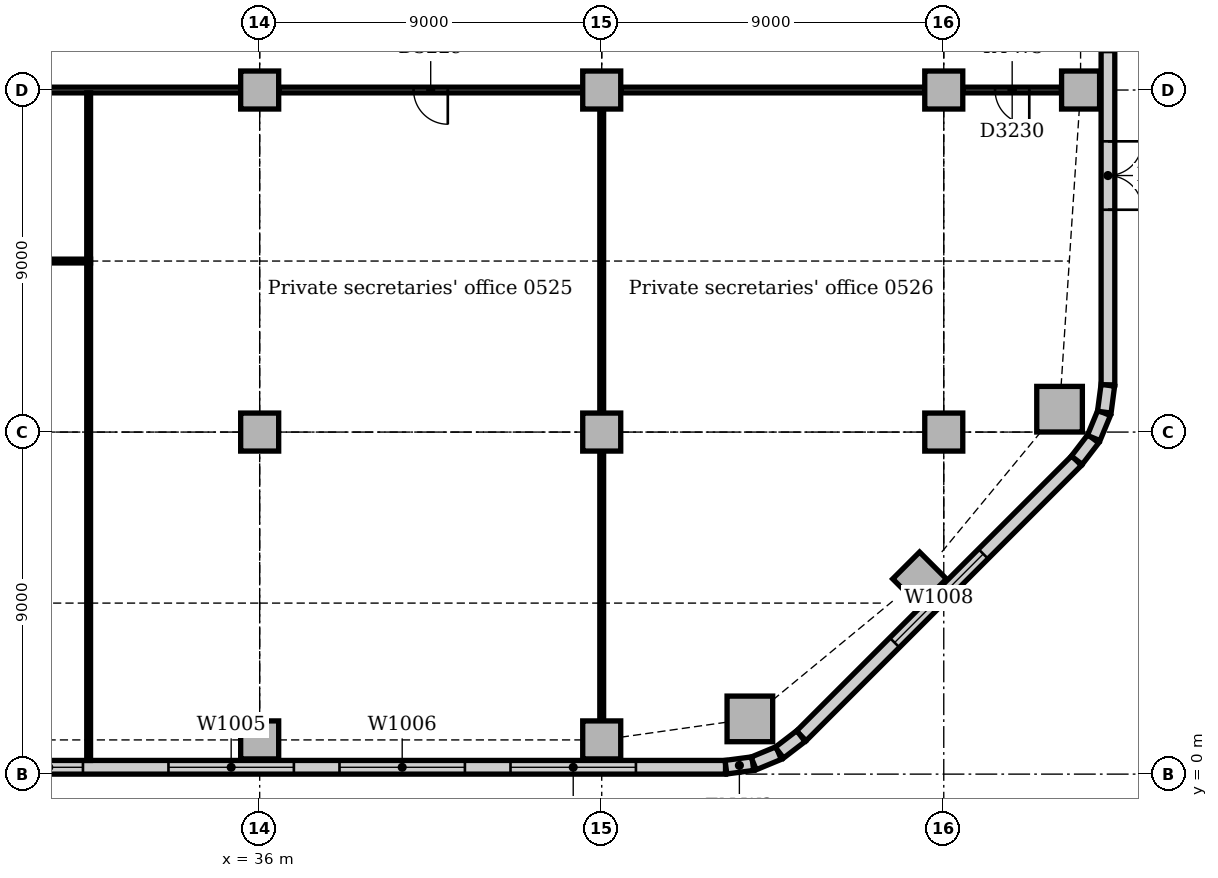
"""IFC4 building model, lengths in metres.
Left out: names, types, materials, properties, quantities, classifications, styles, units other than length and angle.
Written with IfcOpenShell. Run it as: python <this file> out.ifc"""

import sys

from ifc_helpers import new_model, si_unit, direction, frame, frame_2d, origin, origin_2d, place, context, subcontext, project, spatial, rectangle, extrude, element, fill, save


model = new_model("IFC4")
c1 = context("Model", 3, precision=1e-05, world=origin(), true_north=direction((0.0, 1.0)))
c2 = subcontext(c1, "Body", "Model", "MODEL_VIEW")
j1 = project(units=[si_unit("LENGTHUNIT", "METRE"), si_unit("PLANEANGLEUNIT", "RADIAN")], contexts=[c1])
p1 = place(None, origin())
s1 = spatial("IfcSite", under=j1, at=p1, CompositionType="ELEMENT")
p2 = place(p1, origin())
s2 = spatial("IfcBuilding", under=s1, at=p2, CompositionType="ELEMENT")
p3 = place(p2, frame((0.0, 0.0, 26.0)))
s3 = spatial("IfcBuildingStorey", under=s2, at=p3, CompositionType="ELEMENT", Elevation=26.0)
for number, where, z_axis, x_axis in (
    (1, (48.898, 1.453, 0.0), (0.0, 0.0, 1.0), (1.0, 0.0, 0.0)),
    (2, (57.047, 9.602, 0.0), (0.0, 0.0, 1.0), (1.0, 0.0, 0.0)),
):
    element("IfcColumn", number, at=place(p3, frame(where, z_axis=z_axis, x_axis=x_axis)), inside=s3, PredefinedType="COLUMN", context=c2, shape_type="SweptSolid", body=[
        extrude(rectangle(XDim=1.2, YDim=1.2, at=origin_2d()), origin(), (0.0, 0.0, 1.0), 3.85),
    ])
for number, where, z_axis, x_axis in (
    (3, (36.0, 0.9, 0.0), (0.0, 0.0, 1.0), (1.0, 0.0, 0.0)),
    (4, (45.0, 0.9, 0.0), (0.0, 0.0, 1.0), (1.0, 0.0, 0.0)),
    (5, (53.364, 5.136, 0.0), (0.0, 0.0, 1.0), (0.707, 0.707, 0.0)),
    (6, (57.6, 18.0, 0.0), (0.0, 0.0, 1.0), (1.0, 0.0, 0.0)),
    (7, (36.0, 9.0, 0.0), (0.0, 0.0, 1.0), (1.0, 0.0, 0.0)),
    (8, (36.0, 18.0, 0.0), (0.0, 0.0, 1.0), (1.0, 0.0, 0.0)),
    (9, (45.0, 9.0, 0.0), (0.0, 0.0, 1.0), (1.0, 0.0, 0.0)),
    (10, (45.0, 18.0, 0.0), (0.0, 0.0, 1.0), (1.0, 0.0, 0.0)),
    (11, (54.0, 9.0, 0.0), (0.0, 0.0, 1.0), (1.0, 0.0, 0.0)),
    (12, (54.0, 18.0, 0.0), (0.0, 0.0, 1.0), (1.0, 0.0, 0.0)),
):
    element("IfcColumn", number, at=place(p3, frame(where, z_axis=z_axis, x_axis=x_axis)), inside=s3, PredefinedType="COLUMN", context=c2, shape_type="SweptSolid", body=[
        extrude(rectangle(XDim=1.0, YDim=1.0, at=origin_2d()), origin(), (0.0, 0.0, 1.0), 3.85),
    ])
p4 = place(p3, frame((4.243, 0.18, 0.0), z_axis=(0.0, 0.0, 1.0), x_axis=(1.0, 0.0, 0.0)))
e13 = element("IfcWall", 13, at=p4, inside=s3, PredefinedType="STANDARD", context=c2, shape_type="SweptSolid", body=[
    extrude(rectangle(XDim=44.015, YDim=0.36, at=frame_2d((22.007, 0.0))), origin(), (0.0, 0.0, 1.0), 3.85),
])
p5 = place(p4, frame((2.707, 0.0, 0.9)))
e14 = element("IfcOpeningElement", 14, at=p5, cuts=e13, PredefinedType="OPENING", context=c2, shape_type="SweptSolid", body=[
    extrude(rectangle(XDim=3.3, YDim=1.6, at=frame_2d((1.65, 0.8))), frame((0.0, 0.19, 0.0), z_axis=(0.0, -1.0, 0.0), x_axis=(1.0, 0.0, 0.0)), (0.0, 0.0, 1.0), 0.38),
])
p6 = place(p4, frame((7.157, 0.0, 0.0)))
e15 = element("IfcOpeningElement", 15, at=p6, cuts=e13, PredefinedType="OPENING", context=c2, shape_type="SweptSolid", body=[
    extrude(rectangle(XDim=1.8, YDim=2.4, at=frame_2d((0.9, 1.2))), frame((0.0, 0.19, 0.0), z_axis=(0.0, -1.0, 0.0), x_axis=(1.0, 0.0, 0.0)), (0.0, 0.0, 1.0), 0.38),
])
p7 = place(p4, frame((11.357, 0.0, 0.9)))
e16 = element("IfcOpeningElement", 16, at=p7, cuts=e13, PredefinedType="OPENING", context=c2, shape_type="SweptSolid", body=[
    extrude(rectangle(XDim=3.3, YDim=1.6, at=frame_2d((1.65, 0.8))), frame((0.0, 0.19, 0.0), z_axis=(0.0, -1.0, 0.0), x_axis=(1.0, 0.0, 0.0)), (0.0, 0.0, 1.0), 0.38),
])
p8 = place(p4, frame((16.307, 0.0, 0.9)))
e17 = element("IfcOpeningElement", 17, at=p8, cuts=e13, PredefinedType="OPENING", context=c2, shape_type="SweptSolid", body=[
    extrude(rectangle(XDim=1.8, YDim=1.6, at=frame_2d((0.9, 0.8))), frame((0.0, 0.19, 0.0), z_axis=(0.0, -1.0, 0.0), x_axis=(1.0, 0.0, 0.0)), (0.0, 0.0, 1.0), 0.38),
])
p9 = place(p4, frame((20.357, 0.0, 0.9)))
e18 = element("IfcOpeningElement", 18, at=p9, cuts=e13, PredefinedType="OPENING", context=c2, shape_type="SweptSolid", body=[
    extrude(rectangle(XDim=3.3, YDim=1.6, at=frame_2d((1.65, 0.8))), frame((0.0, 0.19, 0.0), z_axis=(0.0, -1.0, 0.0), x_axis=(1.0, 0.0, 0.0)), (0.0, 0.0, 1.0), 0.38),
])
p10 = place(p4, frame((25.307, 0.0, 0.9)))
e19 = element("IfcOpeningElement", 19, at=p10, cuts=e13, PredefinedType="OPENING", context=c2, shape_type="SweptSolid", body=[
    extrude(rectangle(XDim=1.8, YDim=1.6, at=frame_2d((0.9, 0.8))), frame((0.0, 0.19, 0.0), z_axis=(0.0, -1.0, 0.0), x_axis=(1.0, 0.0, 0.0)), (0.0, 0.0, 1.0), 0.38),
])
p11 = place(p4, frame((29.357, 0.0, 0.9)))
e20 = element("IfcOpeningElement", 20, at=p11, cuts=e13, PredefinedType="OPENING", context=c2, shape_type="SweptSolid", body=[
    extrude(rectangle(XDim=3.3, YDim=1.6, at=frame_2d((1.65, 0.8))), frame((0.0, 0.19, 0.0), z_axis=(0.0, -1.0, 0.0), x_axis=(1.0, 0.0, 0.0)), (0.0, 0.0, 1.0), 0.38),
])
p12 = place(p4, frame((33.857, 0.0, 0.9)))
e21 = element("IfcOpeningElement", 21, at=p12, cuts=e13, PredefinedType="OPENING", context=c2, shape_type="SweptSolid", body=[
    extrude(rectangle(XDim=3.3, YDim=1.6, at=frame_2d((1.65, 0.8))), frame((0.0, 0.19, 0.0), z_axis=(0.0, -1.0, 0.0), x_axis=(1.0, 0.0, 0.0)), (0.0, 0.0, 1.0), 0.38),
])
p13 = place(p4, frame((38.357, 0.0, 0.9)))
e22 = element("IfcOpeningElement", 22, at=p13, cuts=e13, PredefinedType="OPENING", context=c2, shape_type="SweptSolid", body=[
    extrude(rectangle(XDim=3.3, YDim=1.6, at=frame_2d((1.65, 0.8))), frame((0.0, 0.19, 0.0), z_axis=(0.0, -1.0, 0.0), x_axis=(1.0, 0.0, 0.0)), (0.0, 0.0, 1.0), 0.38),
])
p14 = place(p3, frame((50.251, 1.006, 0.0), z_axis=(0.0, 0.0, 1.0), x_axis=(0.707106781187, 0.707106781187, 0.0)))
e23 = element("IfcWall", 23, at=p14, inside=s3, PredefinedType="STANDARD", context=c2, shape_type="SweptSolid", body=[
    extrude(rectangle(XDim=10.243, YDim=0.36, at=frame_2d((5.121, 0.0))), origin(), (0.0, 0.0, 1.0), 3.85),
])
p15 = place(p14, frame((3.471, 0.0, 0.9)))
e24 = element("IfcOpeningElement", 24, at=p15, cuts=e23, PredefinedType="OPENING", context=c2, shape_type="SweptSolid", body=[
    extrude(rectangle(XDim=3.3, YDim=1.6, at=frame_2d((1.65, 0.8))), frame((0.0, 0.19, 0.0), z_axis=(0.0, -1.0, 0.0), x_axis=(1.0, 0.0, 0.0)), (0.0, 0.0, 1.0), 0.38),
])
p16 = place(p3, frame((58.32, 10.243, 0.0), z_axis=(0.0, 0.0, 1.0), x_axis=(0.0, 1.0, 0.0)))
e25 = element("IfcWall", 25, at=p16, inside=s3, PredefinedType="STANDARD", context=c2, shape_type="SweptSolid", body=[
    extrude(rectangle(XDim=24.515, YDim=0.36, at=frame_2d((12.257, 0.0))), origin(), (0.0, 0.0, 1.0), 3.85),
])
p17 = place(p16, frame((4.607, 0.0, 0.0)))
e26 = element("IfcOpeningElement", 26, at=p17, cuts=e25, PredefinedType="OPENING", context=c2, shape_type="SweptSolid", body=[
    extrude(rectangle(XDim=1.8, YDim=2.4, at=frame_2d((0.9, 1.2))), frame((0.0, 0.19, 0.0), z_axis=(0.0, -1.0, 0.0), x_axis=(1.0, 0.0, 0.0)), (0.0, 0.0, 1.0), 0.38),
])
p18 = place(p16, frame((8.757, 0.0, 0.9)))
e27 = element("IfcOpeningElement", 27, at=p18, cuts=e25, PredefinedType="OPENING", context=c2, shape_type="SweptSolid", body=[
    extrude(rectangle(XDim=1.8, YDim=1.6, at=frame_2d((0.9, 0.8))), frame((0.0, 0.19, 0.0), z_axis=(0.0, -1.0, 0.0), x_axis=(1.0, 0.0, 0.0)), (0.0, 0.0, 1.0), 0.38),
])
p19 = place(p16, frame((12.557, 0.0, 0.9)))
e28 = element("IfcOpeningElement", 28, at=p19, cuts=e25, PredefinedType="OPENING", context=c2, shape_type="SweptSolid", body=[
    extrude(rectangle(XDim=3.3, YDim=1.6, at=frame_2d((1.65, 0.8))), frame((0.0, 0.19, 0.0), z_axis=(0.0, -1.0, 0.0), x_axis=(1.0, 0.0, 0.0)), (0.0, 0.0, 1.0), 0.38),
])
p20 = place(p16, frame((17.357, 0.0, 0.9)))
e29 = element("IfcOpeningElement", 29, at=p20, cuts=e25, PredefinedType="OPENING", context=c2, shape_type="SweptSolid", body=[
    extrude(rectangle(XDim=3.3, YDim=1.6, at=frame_2d((1.65, 0.8))), frame((0.0, 0.19, 0.0), z_axis=(0.0, -1.0, 0.0), x_axis=(1.0, 0.0, 0.0)), (0.0, 0.0, 1.0), 0.38),
])
for number, where, z_axis, x_axis in (
    (30, (48.269, 0.183, 0.0), (0.0, 0.0, 1.0), (0.991, 0.131, 0.0)),
    (31, (48.997, 0.282, 0.0), (0.0, 0.0, 1.0), (0.924, 0.383, 0.0)),
):
    element("IfcWall", number, at=place(p3, frame(where, z_axis=z_axis, x_axis=x_axis)), inside=s3, PredefinedType="STANDARD", context=c2, shape_type="SweptSolid", body=[
        extrude(rectangle(XDim=0.713, YDim=0.36, at=frame_2d((0.356, 0.0))), origin(), (0.0, 0.0, 1.0), 3.85),
    ])
for number, where, z_axis, x_axis in (
    (32, (49.675, 0.566, 0.0), (0.0, 0.0, 1.0), (0.793, 0.609, 0.0)),
    (33, (57.5, 8.259, 0.0), (0.0, 0.0, 1.0), (0.609, 0.793, 0.0)),
):
    element("IfcWall", number, at=place(p3, frame(where, z_axis=z_axis, x_axis=x_axis)), inside=s3, PredefinedType="STANDARD", context=c2, shape_type="SweptSolid", body=[
        extrude(rectangle(XDim=0.713, YDim=0.36, at=frame_2d((0.357, 0.0))), origin(), (0.0, 0.0, 1.0), 3.85),
    ])
for number, where, z_axis, x_axis in (
    (34, (57.945, 8.844, 0.0), (0.0, 0.0, 1.0), (0.383, 0.924, 0.0)),
    (35, (58.224, 9.524, 0.0), (0.0, 0.0, 1.0), (0.131, 0.991, 0.0)),
):
    element("IfcWall", number, at=place(p3, frame(where, z_axis=z_axis, x_axis=x_axis)), inside=s3, PredefinedType="STANDARD", context=c2, shape_type="SweptSolid", body=[
        extrude(rectangle(XDim=0.713, YDim=0.36, at=frame_2d((0.356, 0.0))), origin(), (0.0, 0.0, 1.0), 3.85),
    ])
p21 = place(p3, frame((54.5, 18.0, 0.0), z_axis=(0.0, 0.0, 1.0), x_axis=(1.0, 0.0, 0.0)))
e36 = element("IfcWall", 36, at=p21, inside=s3, PredefinedType="PARTITIONING", context=c2, shape_type="SweptSolid", body=[
    extrude(rectangle(XDim=2.6, YDim=0.15, at=frame_2d((1.3, 0.0))), origin(), (0.0, 0.0, 1.0), 3.602),
])
p22 = place(p21, frame((0.85, 0.0, 0.0)))
e37 = element("IfcOpeningElement", 37, at=p22, cuts=e36, PredefinedType="OPENING", context=c2, shape_type="SweptSolid", body=[
    extrude(rectangle(XDim=0.9, YDim=2.1, at=frame_2d((0.45, 1.05))), frame((0.0, 0.085, 0.0), z_axis=(0.0, -1.0, 0.0), x_axis=(1.0, 0.0, 0.0)), (0.0, 0.0, 1.0), 0.17),
])
p23 = place(p3, frame((45.5, 18.0, 0.0), z_axis=(0.0, 0.0, 1.0), x_axis=(1.0, 0.0, 0.0)))
e38 = element("IfcWall", 38, at=p23, inside=s3, PredefinedType="PARTITIONING", context=c2, shape_type="SweptSolid", body=[
    extrude(rectangle(XDim=8.0, YDim=0.15, at=frame_2d((4.0, 0.0))), origin(), (0.0, 0.0, 1.0), 3.15),
])
p24 = place(p3, frame((36.5, 18.0, 0.0), z_axis=(0.0, 0.0, 1.0), x_axis=(1.0, 0.0, 0.0)))
e39 = element("IfcWall", 39, at=p24, inside=s3, PredefinedType="PARTITIONING", context=c2, shape_type="SweptSolid", body=[
    extrude(rectangle(XDim=8.0, YDim=0.15, at=frame_2d((4.0, 0.0))), origin(), (0.0, 0.0, 1.0), 3.15),
])
p25 = place(p24, frame((3.55, 0.0, 0.0)))
e40 = element("IfcOpeningElement", 40, at=p25, cuts=e39, PredefinedType="OPENING", context=c2, shape_type="SweptSolid", body=[
    extrude(rectangle(XDim=0.9, YDim=2.1, at=frame_2d((0.45, 1.05))), frame((0.0, 0.085, 0.0), z_axis=(0.0, -1.0, 0.0), x_axis=(1.0, 0.0, 0.0)), (0.0, 0.0, 1.0), 0.17),
])
p26 = place(p3, frame((27.5, 18.0, 0.0), z_axis=(0.0, 0.0, 1.0), x_axis=(1.0, 0.0, 0.0)))
e41 = element("IfcWall", 41, at=p26, inside=s3, PredefinedType="PARTITIONING", context=c2, shape_type="SweptSolid", body=[
    extrude(rectangle(XDim=8.0, YDim=0.15, at=frame_2d((4.0, 0.0))), origin(), (0.0, 0.0, 1.0), 3.15),
])
p27 = place(p3, frame((13.575, 13.5, 0.0), z_axis=(0.0, 0.0, 1.0), x_axis=(1.0, 0.0, 0.0)))
e42 = element("IfcWall", 42, at=p27, inside=s3, PredefinedType="PARTITIONING", context=c2, shape_type="SweptSolid", body=[
    extrude(rectangle(XDim=17.975, YDim=0.1, at=frame_2d((8.988, 0.0))), origin(), (0.0, 0.0, 1.0), 3.35),
])
p28 = place(p27, frame((4.1, 0.0, 0.0)))
e43 = element("IfcOpeningElement", 43, at=p28, cuts=e42, PredefinedType="OPENING", context=c2, shape_type="SweptSolid", body=[
    extrude(rectangle(XDim=0.9, YDim=2.1, at=frame_2d((0.45, 1.05))), frame((0.0, 0.06, 0.0), z_axis=(0.0, -1.0, 0.0), x_axis=(1.0, 0.0, 0.0)), (0.0, 0.0, 1.0), 0.12),
])
p29 = place(p27, frame((12.925, 0.0, 0.0)))
e44 = element("IfcOpeningElement", 44, at=p29, cuts=e42, PredefinedType="OPENING", context=c2, shape_type="SweptSolid", body=[
    extrude(rectangle(XDim=0.9, YDim=2.1, at=frame_2d((0.45, 1.05))), frame((0.0, 0.06, 0.0), z_axis=(0.0, -1.0, 0.0), x_axis=(1.0, 0.0, 0.0)), (0.0, 0.0, 1.0), 0.12),
])
p30 = place(p3, frame((31.5, 13.55, 0.0), z_axis=(0.0, 0.0, 1.0), x_axis=(0.0, 1.0, 0.0)))
e45 = element("IfcWall", 45, at=p30, inside=s3, PredefinedType="PARTITIONING", context=c2, shape_type="SweptSolid", body=[
    extrude(rectangle(XDim=4.375, YDim=0.1, at=frame_2d((2.188, 0.0))), origin(), (0.0, 0.0, 1.0), 3.85),
])
p31 = place(p3, frame((31.5, 0.36, 0.0), z_axis=(0.0, 0.0, 1.0), x_axis=(0.0, 1.0, 0.0)))
e46 = element("IfcWall", 46, at=p31, inside=s3, PredefinedType="PARTITIONING", context=c2, shape_type="SweptSolid", body=[
    extrude(rectangle(XDim=13.09, YDim=0.1, at=frame_2d((6.545, 0.0))), origin(), (0.0, 0.0, 1.0), 3.85),
])
p32 = place(p3, frame((45.0, 1.4, 0.0), z_axis=(0.0, 0.0, 1.0), x_axis=(0.0, 1.0, 0.0)))
e47 = element("IfcWall", 47, at=p32, inside=s3, PredefinedType="PARTITIONING", context=c2, shape_type="SweptSolid", body=[
    extrude(rectangle(XDim=7.1, YDim=0.1, at=frame_2d((3.55, 0.0))), origin(), (0.0, 0.0, 1.0), 3.158),
])
p33 = place(p3, frame((45.0, 9.5, 0.0), z_axis=(0.0, 0.0, 1.0), x_axis=(0.0, 1.0, 0.0)))
e48 = element("IfcWall", 48, at=p33, inside=s3, PredefinedType="PARTITIONING", context=c2, shape_type="SweptSolid", body=[
    extrude(rectangle(XDim=8.0, YDim=0.1, at=frame_2d((4.0, 0.0))), origin(), (0.0, 0.0, 1.0), 3.158),
])
p34 = place(p10, origin())
e49 = element("IfcWindow", 49, at=p34, inside=s3, PartitioningType="SINGLE_PANEL", PredefinedType="WINDOW", context=c2, shape_type="SweptSolid", body=[
    extrude(rectangle(XDim=1.8, YDim=1.6, at=frame_2d((0.9, 0.8))), frame((0.0, 0.13, 0.0), z_axis=(0.0, -1.0, 0.0), x_axis=(1.0, 0.0, 0.0)), (0.0, 0.0, 1.0), 0.06),
])
fill(e19, e49)
p35 = place(p11, origin())
e50 = element("IfcWindow", 50, at=p35, inside=s3, PartitioningType="SINGLE_PANEL", PredefinedType="WINDOW", context=c2, shape_type="SweptSolid", body=[
    extrude(rectangle(XDim=3.3, YDim=1.6, at=frame_2d((1.65, 0.8))), frame((0.0, 0.13, 0.0), z_axis=(0.0, -1.0, 0.0), x_axis=(1.0, 0.0, 0.0)), (0.0, 0.0, 1.0), 0.06),
])
fill(e20, e50)
p36 = place(p12, origin())
e51 = element("IfcWindow", 51, at=p36, inside=s3, PartitioningType="SINGLE_PANEL", PredefinedType="WINDOW", context=c2, shape_type="SweptSolid", body=[
    extrude(rectangle(XDim=3.3, YDim=1.6, at=frame_2d((1.65, 0.8))), frame((0.0, 0.13, 0.0), z_axis=(0.0, -1.0, 0.0), x_axis=(1.0, 0.0, 0.0)), (0.0, 0.0, 1.0), 0.06),
])
fill(e21, e51)
p37 = place(p13, origin())
e52 = element("IfcWindow", 52, at=p37, inside=s3, PartitioningType="SINGLE_PANEL", PredefinedType="WINDOW", context=c2, shape_type="SweptSolid", body=[
    extrude(rectangle(XDim=3.3, YDim=1.6, at=frame_2d((1.65, 0.8))), frame((0.0, 0.13, 0.0), z_axis=(0.0, -1.0, 0.0), x_axis=(1.0, 0.0, 0.0)), (0.0, 0.0, 1.0), 0.06),
])
fill(e22, e52)
p38 = place(p15, origin())
e53 = element("IfcWindow", 53, at=p38, inside=s3, PartitioningType="SINGLE_PANEL", PredefinedType="WINDOW", context=c2, shape_type="SweptSolid", body=[
    extrude(rectangle(XDim=3.3, YDim=1.6, at=frame_2d((1.65, 0.8))), frame((0.0, 0.13, 0.0), z_axis=(0.0, -1.0, 0.0), x_axis=(1.0, 0.0, 0.0)), (0.0, 0.0, 1.0), 0.06),
])
fill(e24, e53)
p39 = place(p17, frame((1.8, 0.0, 0.0), z_axis=(0.0, 0.0, 1.0), x_axis=(-1.0, 0.0, 0.0)))
e54 = element("IfcDoor", 54, at=p39, inside=s3, OperationType="DOUBLE_DOOR_SINGLE_SWING", PredefinedType="DOOR", context=c2, shape_type="SweptSolid", body=[
    extrude(rectangle(XDim=1.8, YDim=2.4, at=frame_2d((0.9, 1.2))), frame((0.0, -0.07, 0.0), z_axis=(0.0, -1.0, 0.0), x_axis=(1.0, 0.0, 0.0)), (0.0, 0.0, 1.0), 0.05),
])
fill(e26, e54)
p40 = place(p25, frame((0.9, 0.0, 0.0), z_axis=(0.0, 0.0, 1.0), x_axis=(-1.0, 0.0, 0.0)))
e55 = element("IfcDoor", 55, at=p40, inside=s3, OperationType="SINGLE_SWING_LEFT", PredefinedType="DOOR", context=c2, shape_type="SweptSolid", body=[
    extrude(rectangle(XDim=0.9, YDim=2.1, at=frame_2d((0.45, 1.05))), frame((0.0, 0.025, 0.0), z_axis=(0.0, -1.0, 0.0), x_axis=(1.0, 0.0, 0.0)), (0.0, 0.0, 1.0), 0.05),
])
fill(e40, e55)
p41 = place(p22, frame((0.9, 0.0, 0.0), z_axis=(0.0, 0.0, 1.0), x_axis=(-1.0, 0.0, 0.0)))
e56 = element("IfcDoor", 56, at=p41, inside=s3, OperationType="SINGLE_SWING_LEFT", PredefinedType="DOOR", context=c2, shape_type="SweptSolid", body=[
    extrude(rectangle(XDim=0.9, YDim=2.1, at=frame_2d((0.45, 1.05))), frame((0.0, 0.025, 0.0), z_axis=(0.0, -1.0, 0.0), x_axis=(1.0, 0.0, 0.0)), (0.0, 0.0, 1.0), 0.05),
])
fill(e37, e56)
save(model, sys.argv[1])
